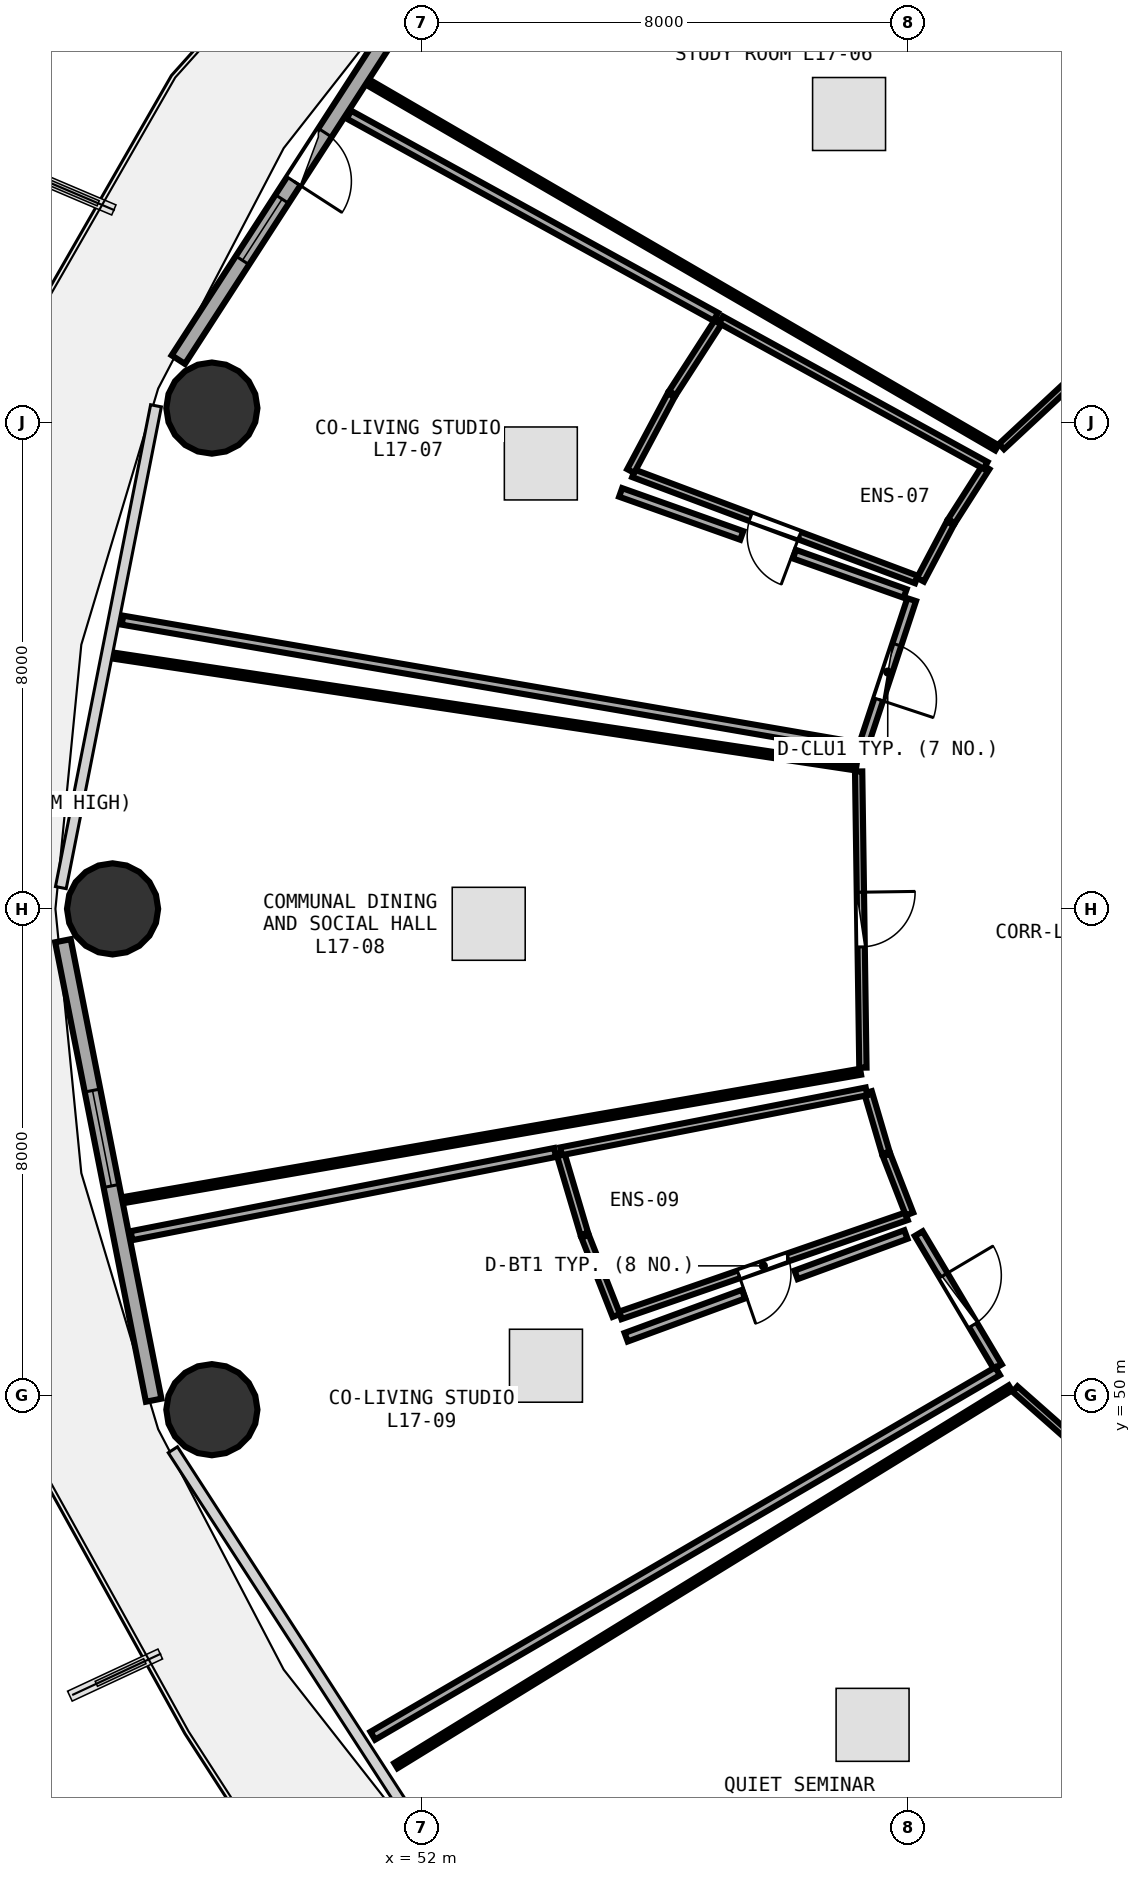
"""IFC4 building model, lengths in metres.
Left out: names, types, materials, properties, quantities, classifications, styles, units other than length and angle.
Written with IfcOpenShell. Run it as: python <this file> out.ifc"""

import sys

from ifc_helpers import new_model, si_unit, direction, frame, frame_2d, origin, origin_2d, place, context, subcontext, project, spatial, rectangle, circle, extrude, element, fill, save


model = new_model("IFC4")
c1 = context("Model", 3, precision=1e-05, world=origin(), true_north=direction((0.0, 1.0)))
c2 = subcontext(c1, "Body", "Model", "MODEL_VIEW")
j1 = project(units=[si_unit("LENGTHUNIT", "METRE"), si_unit("PLANEANGLEUNIT", "RADIAN")], contexts=[c1])
p1 = place(None, origin())
s1 = spatial("IfcSite", under=j1, at=p1, CompositionType="ELEMENT")
p2 = place(p1, origin())
s2 = spatial("IfcBuilding", under=s1, at=p2, CompositionType="ELEMENT")
p3 = place(p2, frame((0.0, 0.0, 67.5)))
s3 = spatial("IfcBuildingStorey", under=s2, at=p3, CompositionType="ELEMENT", Elevation=67.5)
for number, where, z_axis, x_axis in (
    (1, (48.553, 66.236, 0.0), (0.0, 0.0, 1.0), (1.0, 0.0, 0.0)),
    (2, (46.92, 58.0, 0.0), (0.0, 0.0, 1.0), (1.0, 0.0, 0.0)),
    (3, (48.553, 49.764, 0.0), (0.0, 0.0, 1.0), (1.0, 0.0, 0.0)),
):
    element("IfcColumn", number, at=place(p3, frame(where, z_axis=z_axis, x_axis=x_axis)), inside=s3, PredefinedType="COLUMN", context=c2, shape_type="SweptSolid", body=[
        extrude(circle(Radius=0.75, at=origin_2d()), origin(), (0.0, 0.0, 1.0), 4.76),
    ])
p4 = place(p3, frame((52.311, 73.698, 0.0), z_axis=(0.0, 0.0, 1.0), x_axis=(-0.543005114258, -0.839729388488, 0.0)))
e4 = element("IfcWall", 4, at=p4, inside=s3, PredefinedType="SOLIDWALL", context=c2, shape_type="SweptSolid", body=[
    extrude(rectangle(XDim=7.938, YDim=0.26, at=frame_2d((3.969, 0.0))), origin(), (0.0, 0.0, 1.0), 4.345),
])
p5 = place(p4, frame((3.494, 0.0, 0.0)))
e5 = element("IfcOpeningElement", 5, at=p5, cuts=e4, PredefinedType="OPENING", context=c2, shape_type="SweptSolid", body=[
    extrude(rectangle(XDim=0.95, YDim=2.1, at=frame_2d((0.475, 1.05))), frame((0.0, 0.14, 0.0), z_axis=(0.0, -1.0, 0.0), x_axis=(1.0, 0.0, 0.0)), (0.0, 0.0, 1.0), 0.28),
])
p6 = place(p4, frame((4.794, 0.0, 0.85)))
e6 = element("IfcOpeningElement", 6, at=p6, cuts=e4, PredefinedType="OPENING", context=c2, shape_type="SweptSolid", body=[
    extrude(rectangle(XDim=1.2, YDim=1.45, at=frame_2d((0.6, 0.725))), frame((0.0, 0.14, 0.0), z_axis=(0.0, -1.0, 0.0), x_axis=(1.0, 0.0, 0.0)), (0.0, 0.0, 1.0), 0.28),
])
p7 = place(p3, frame((46.104, 57.477, 0.0), z_axis=(0.0, 0.0, 1.0), x_axis=(0.193726159581, -0.98105564322, 0.0)))
e7 = element("IfcWall", 7, at=p7, inside=s3, PredefinedType="SOLIDWALL", context=c2, shape_type="SweptSolid", body=[
    extrude(rectangle(XDim=7.703, YDim=0.26, at=frame_2d((3.851, 0.0))), origin(), (0.0, 0.0, 1.0), 4.345),
])
p8 = place(p7, frame((2.511, 0.0, 0.85)))
e8 = element("IfcOpeningElement", 8, at=p8, cuts=e7, PredefinedType="OPENING", context=c2, shape_type="SweptSolid", body=[
    extrude(rectangle(XDim=1.6, YDim=1.45, at=frame_2d((0.8, 0.725))), frame((0.0, 0.14, 0.0), z_axis=(0.0, -1.0, 0.0), x_axis=(1.0, 0.0, 0.0)), (0.0, 0.0, 1.0), 0.28),
])
p9 = place(p3, frame((65.292, 69.097, 0.0), z_axis=(0.0, 0.0, 1.0), x_axis=(-0.731919362797, -0.681391257915, 0.0)))
e9 = element("IfcWall", 9, at=p9, inside=s3, PredefinedType="PARTITIONING", context=c2, shape_type="SweptSolid", body=[
    extrude(rectangle(XDim=5.126, YDim=0.12, at=frame_2d((2.563, 0.0))), origin(), (0.0, 0.0, 1.0), 2.345),
])
p10 = place(p9, frame((2.113, 0.0, 0.0)))
e10 = element("IfcOpeningElement", 10, at=p10, cuts=e9, PredefinedType="OPENING", context=c2, shape_type="SweptSolid", body=[
    extrude(rectangle(XDim=0.9, YDim=2.08, at=frame_2d((0.45, 1.04))), frame((0.0, 0.07, 0.0), z_axis=(0.0, -1.0, 0.0), x_axis=(1.0, 0.0, 0.0)), (0.0, 0.0, 1.0), 0.14),
])
p11 = place(p3, frame((60.141, 63.416, 0.0), z_axis=(0.0, 0.0, 1.0), x_axis=(-0.93625445313, 0.351322642301, 0.0)))
e11 = element("IfcWall", 11, at=p11, inside=s3, PredefinedType="PLUMBINGWALL", context=c2, shape_type="SweptSolid", body=[
    extrude(rectangle(XDim=4.969, YDim=0.13, at=frame_2d((2.485, 0.0))), origin(), (0.0, 0.0, 1.0), 2.345),
])
p12 = place(p11, frame((2.055, 0.0, 0.0)))
e12 = element("IfcOpeningElement", 12, at=p12, cuts=e11, PredefinedType="OPENING", context=c2, shape_type="SweptSolid", body=[
    extrude(rectangle(XDim=0.86, YDim=2.05, at=frame_2d((0.43, 1.025))), frame((0.0, 0.075, 0.0), z_axis=(0.0, -1.0, 0.0), x_axis=(1.0, 0.0, 0.0)), (0.0, 0.0, 1.0), 0.15),
])
p13 = place(p3, frame((60.062, 63.085, 0.0), z_axis=(0.0, 0.0, 1.0), x_axis=(-0.313977919329, -0.949430285052, 0.0)))
e13 = element("IfcWall", 13, at=p13, inside=s3, PredefinedType="PARTITIONING", context=c2, shape_type="SweptSolid", body=[
    extrude(rectangle(XDim=2.508, YDim=0.15, at=frame_2d((1.254, 0.0))), origin(), (0.0, 0.0, 1.0), 4.105),
])
p14 = place(p13, frame((0.779, 0.0, 0.0)))
e14 = element("IfcOpeningElement", 14, at=p14, cuts=e13, PredefinedType="OPENING", context=c2, shape_type="SweptSolid", body=[
    extrude(rectangle(XDim=0.95, YDim=2.08, at=frame_2d((0.475, 1.04))), frame((0.0, 0.085, 0.0), z_axis=(0.0, -1.0, 0.0), x_axis=(1.0, 0.0, 0.0)), (0.0, 0.0, 1.0), 0.17),
])
p15 = place(p3, frame((59.19, 60.26, 0.0), z_axis=(0.0, 0.0, 1.0), x_axis=(0.014383034903, -0.999896558803, 0.0)))
e15 = element("IfcWall", 15, at=p15, inside=s3, PredefinedType="PARTITIONING", context=c2, shape_type="SweptSolid", body=[
    extrude(rectangle(XDim=4.872, YDim=0.12, at=frame_2d((2.436, 0.0))), origin(), (0.0, 0.0, 1.0), 2.345),
])
p16 = place(p15, frame((1.986, 0.0, 0.0)))
e16 = element("IfcOpeningElement", 16, at=p16, cuts=e15, PredefinedType="OPENING", context=c2, shape_type="SweptSolid", body=[
    extrude(rectangle(XDim=0.9, YDim=2.08, at=frame_2d((0.45, 1.04))), frame((0.0, 0.07, 0.0), z_axis=(0.0, -1.0, 0.0), x_axis=(1.0, 0.0, 0.0)), (0.0, 0.0, 1.0), 0.14),
])
p17 = place(p3, frame((59.977, 52.944, 0.0), z_axis=(0.0, 0.0, 1.0), x_axis=(-0.945000053877, -0.327070173163, 0.0)))
e17 = element("IfcWall", 17, at=p17, inside=s3, PredefinedType="PLUMBINGWALL", context=c2, shape_type="SweptSolid", body=[
    extrude(rectangle(XDim=4.982, YDim=0.13, at=frame_2d((2.491, 0.0))), origin(), (0.0, 0.0, 1.0), 4.045),
])
p18 = place(p17, frame((2.061, 0.0, 0.0)))
e18 = element("IfcOpeningElement", 18, at=p18, cuts=e17, PredefinedType="OPENING", context=c2, shape_type="SweptSolid", body=[
    extrude(rectangle(XDim=0.86, YDim=2.05, at=frame_2d((0.43, 1.025))), frame((0.0, 0.075, 0.0), z_axis=(0.0, -1.0, 0.0), x_axis=(1.0, 0.0, 0.0)), (0.0, 0.0, 1.0), 0.15),
])
p19 = place(p3, frame((60.179, 52.659, 0.0), z_axis=(0.0, 0.0, 1.0), x_axis=(0.510684908265, -0.859767948036, 0.0)))
e19 = element("IfcWall", 19, at=p19, inside=s3, PredefinedType="PARTITIONING", context=c2, shape_type="SweptSolid", body=[
    extrude(rectangle(XDim=2.547, YDim=0.15, at=frame_2d((1.273, 0.0))), origin(), (0.0, 0.0, 1.0), 2.345),
])
p20 = place(p19, frame((0.799, 0.0, 0.0)))
e20 = element("IfcOpeningElement", 20, at=p20, cuts=e19, PredefinedType="OPENING", context=c2, shape_type="SweptSolid", body=[
    extrude(rectangle(XDim=0.95, YDim=2.08, at=frame_2d((0.475, 1.04))), frame((0.0, 0.085, 0.0), z_axis=(0.0, -1.0, 0.0), x_axis=(1.0, 0.0, 0.0)), (0.0, 0.0, 1.0), 0.17),
])
p21 = place(p3, frame((61.763, 50.103, 0.0), z_axis=(0.0, 0.0, 1.0), x_axis=(0.749467713759, -0.662040894532, 0.0)))
e21 = element("IfcWall", 21, at=p21, inside=s3, PredefinedType="PARTITIONING", context=c2, shape_type="SweptSolid", body=[
    extrude(rectangle(XDim=5.141, YDim=0.12, at=frame_2d((2.571, 0.0))), origin(), (0.0, 0.0, 1.0), 2.345),
])
p22 = place(p21, frame((2.121, 0.0, 0.0)))
e22 = element("IfcOpeningElement", 22, at=p22, cuts=e21, PredefinedType="OPENING", context=c2, shape_type="SweptSolid", body=[
    extrude(rectangle(XDim=0.9, YDim=2.08, at=frame_2d((0.45, 1.04))), frame((0.0, 0.07, 0.0), z_axis=(0.0, -1.0, 0.0), x_axis=(1.0, 0.0, 0.0)), (0.0, 0.0, 1.0), 0.14),
])
p23 = place(p3, frame((65.615, 69.358, 0.0), z_axis=(0.0, 0.0, 1.0), x_axis=(-0.6091849282, 0.793028198271, 0.0)))
e23 = element("IfcWall", 23, at=p23, inside=s3, PredefinedType="PARTITIONING", context=c2, shape_type="SweptSolid", body=[
    extrude(rectangle(XDim=11.289, YDim=0.1, at=frame_2d((5.645, 0.0))), origin(), (0.0, 0.0, 1.0), 2.345),
])
p24 = place(p3, frame((61.461, 65.583, 0.0), z_axis=(0.0, 0.0, 1.0), x_axis=(-0.864576212426, 0.502501714333, 0.0)))
e24 = element("IfcWall", 24, at=p24, inside=s3, PredefinedType="PARTITIONING", context=c2, shape_type="SweptSolid", body=[
    extrude(rectangle(XDim=11.9, YDim=0.1, at=frame_2d((5.95, 0.0))), origin(), (0.0, 0.0, 1.0), 2.345),
])
p25 = place(p3, frame((58.185, 77.973, 0.0), z_axis=(0.0, 0.0, 1.0), x_axis=(0.629127534858, -0.777302093708, 0.0)))
e25 = element("IfcWall", 25, at=p25, inside=s3, PredefinedType="PARTITIONING", context=c2, shape_type="SweptSolid", body=[
    extrude(rectangle(XDim=11.326, YDim=0.1, at=frame_2d((5.663, 0.0))), origin(), (0.0, 0.0, 1.0), 2.345),
])
p26 = place(p3, frame((61.285, 65.266, 0.0), z_axis=(0.0, 0.0, 1.0), x_axis=(-0.53816125517, -0.842841897057, 0.0)))
e26 = element("IfcWall", 26, at=p26, inside=s3, PredefinedType="PLUMBINGWALL", context=c2, shape_type="SweptSolid", body=[
    extrude(rectangle(XDim=1.056, YDim=0.13, at=frame_2d((0.528, 0.0))), origin(), (0.0, 0.0, 1.0), 2.345),
])
p27 = place(p3, frame((60.697, 64.341, 0.0), z_axis=(0.0, 0.0, 1.0), x_axis=(-0.467001016817, -0.884256778482, 0.0)))
e27 = element("IfcWall", 27, at=p27, inside=s3, PredefinedType="PLUMBINGWALL", context=c2, shape_type="SweptSolid", body=[
    extrude(rectangle(XDim=1.05, YDim=0.13, at=frame_2d((0.525, 0.0))), origin(), (0.0, 0.0, 1.0), 4.105),
])
p28 = place(p3, frame((55.441, 65.201, 0.0), z_axis=(0.0, 0.0, 1.0), x_axis=(0.470471737127, 0.882415063654, 0.0)))
e28 = element("IfcWall", 28, at=p28, inside=s3, PredefinedType="PLUMBINGWALL", context=c2, shape_type="SweptSolid", body=[
    extrude(rectangle(XDim=1.414, YDim=0.13, at=frame_2d((0.707, 0.0))), origin(), (0.0, 0.0, 1.0), 2.345),
])
p29 = place(p3, frame((56.127, 66.483, 0.0), z_axis=(0.0, 0.0, 1.0), x_axis=(0.542142481081, 0.840286576239, 0.0)))
e29 = element("IfcWall", 29, at=p29, inside=s3, PredefinedType="PLUMBINGWALL", context=c2, shape_type="SweptSolid", body=[
    extrude(rectangle(XDim=1.425, YDim=0.13, at=frame_2d((0.712, 0.0))), origin(), (0.0, 0.0, 1.0), 4.35),
])
p30 = place(p3, frame((56.927, 67.688, 0.0), z_axis=(0.0, 0.0, 1.0), x_axis=(0.87605188001, -0.48221686359, 0.0)))
e30 = element("IfcWall", 30, at=p30, inside=s3, PredefinedType="PLUMBINGWALL", context=c2, shape_type="SweptSolid", body=[
    extrude(rectangle(XDim=4.967, YDim=0.13, at=frame_2d((2.483, 0.0))), origin(), (0.0, 0.0, 1.0), 2.345),
])
p31 = place(p3, frame((59.217, 60.654, 0.0), z_axis=(0.0, 0.0, 1.0), x_axis=(-0.985427357527, 0.170096804898, 0.0)))
e31 = element("IfcWall", 31, at=p31, inside=s3, PredefinedType="PARTITIONING", context=c2, shape_type="SweptSolid", body=[
    extrude(rectangle(XDim=12.313, YDim=0.15, at=frame_2d((6.157, 0.0))), origin(), (0.0, 0.0, 1.0), 2.345),
])
p32 = place(p3, frame((50.807, 71.062, 0.0), z_axis=(0.0, 0.0, 1.0), x_axis=(0.875868518132, -0.482549830531, 0.0)))
e32 = element("IfcWall", 32, at=p32, inside=s3, PredefinedType="PARTITIONING", context=c2, shape_type="SweptSolid", body=[
    extrude(rectangle(XDim=6.889, YDim=0.15, at=frame_2d((3.445, 0.0))), origin(), (0.0, 0.0, 1.0), 2.345),
])
p33 = place(p3, frame((55.276, 64.849, 0.0), z_axis=(0.0, 0.0, 1.0), x_axis=(0.942346688621, -0.334638190357, 0.0)))
e33 = element("IfcWall", 33, at=p33, inside=s3, PredefinedType="PARTITIONING", context=c2, shape_type="SweptSolid", body=[
    extrude(rectangle(XDim=2.114, YDim=0.15, at=frame_2d((1.057, 0.0))), origin(), (0.0, 0.0, 1.0), 4.045),
])
p34 = place(p3, frame((58.135, 63.833, 0.0), z_axis=(0.0, 0.0, 1.0), x_axis=(0.942335197554, -0.334670547629, 0.0)))
e34 = element("IfcWall", 34, at=p34, inside=s3, PredefinedType="PARTITIONING", context=c2, shape_type="SweptSolid", body=[
    extrude(rectangle(XDim=1.932, YDim=0.15, at=frame_2d((0.966, 0.0))), origin(), (0.0, 0.0, 1.0), 4.105),
])
p35 = place(p3, frame((59.222, 55.322, 0.0), z_axis=(0.0, 0.0, 1.0), x_axis=(-0.985176076522, -0.171546198583, 0.0)))
e35 = element("IfcWall", 35, at=p35, inside=s3, PredefinedType="PARTITIONING", context=c2, shape_type="SweptSolid", body=[
    extrude(rectangle(XDim=12.312, YDim=0.1, at=frame_2d((6.156, 0.0))), origin(), (0.0, 0.0, 1.0), 2.345),
])
p36 = place(p3, frame((46.961, 62.161, 0.0), z_axis=(0.0, 0.0, 1.0), x_axis=(0.988857033015, -0.14886829164, 0.0)))
e36 = element("IfcWall", 36, at=p36, inside=s3, PredefinedType="PARTITIONING", context=c2, shape_type="SweptSolid", body=[
    extrude(rectangle(XDim=12.326, YDim=0.1, at=frame_2d((6.163, 0.0))), origin(), (0.0, 0.0, 1.0), 2.345),
])
p37 = place(p3, frame((59.344, 54.984, 0.0), z_axis=(0.0, 0.0, 1.0), x_axis=(0.282370492218, -0.959305428487, 0.0)))
e37 = element("IfcWall", 37, at=p37, inside=s3, PredefinedType="PLUMBINGWALL", context=c2, shape_type="SweptSolid", body=[
    extrude(rectangle(XDim=1.036, YDim=0.13, at=frame_2d((0.518, 0.0))), origin(), (0.0, 0.0, 1.0), 4.35),
])
p38 = place(p3, frame((59.649, 53.952, 0.0), z_axis=(0.0, 0.0, 1.0), x_axis=(0.362514197989, -0.931978248811, 0.0)))
e38 = element("IfcWall", 38, at=p38, inside=s3, PredefinedType="PLUMBINGWALL", context=c2, shape_type="SweptSolid", body=[
    extrude(rectangle(XDim=1.041, YDim=0.13, at=frame_2d((0.52, 0.0))), origin(), (0.0, 0.0, 1.0), 4.105),
])
p39 = place(p3, frame((55.205, 51.314, 0.0), z_axis=(0.0, 0.0, 1.0), x_axis=(-0.366277671592, 0.930505597669, 0.0)))
e39 = element("IfcWall", 39, at=p39, inside=s3, PredefinedType="PLUMBINGWALL", context=c2, shape_type="SweptSolid", body=[
    extrude(rectangle(XDim=1.401, YDim=0.13, at=frame_2d((0.701, 0.0))), origin(), (0.0, 0.0, 1.0), 4.35),
])
p40 = place(p3, frame((54.678, 52.655, 0.0), z_axis=(0.0, 0.0, 1.0), x_axis=(-0.284613387728, 0.958642383543, 0.0)))
e40 = element("IfcWall", 40, at=p40, inside=s3, PredefinedType="PLUMBINGWALL", context=c2, shape_type="SweptSolid", body=[
    extrude(rectangle(XDim=1.393, YDim=0.13, at=frame_2d((0.697, 0.0))), origin(), (0.0, 0.0, 1.0), 4.35),
])
p41 = place(p3, frame((54.296, 54.014, 0.0), z_axis=(0.0, 0.0, 1.0), x_axis=(0.981295026007, 0.192509926844, 0.0)))
e41 = element("IfcWall", 41, at=p41, inside=s3, PredefinedType="PLUMBINGWALL", context=c2, shape_type="SweptSolid", body=[
    extrude(rectangle(XDim=5.118, YDim=0.13, at=frame_2d((2.559, 0.0))), origin(), (0.0, 0.0, 1.0), 4.045),
])
p42 = place(p3, frame((61.476, 50.398, 0.0), z_axis=(0.0, 0.0, 1.0), x_axis=(-0.863734985538, -0.503946301462, 0.0)))
e42 = element("IfcWall", 42, at=p42, inside=s3, PredefinedType="PARTITIONING", context=c2, shape_type="SweptSolid", body=[
    extrude(rectangle(XDim=11.897, YDim=0.15, at=frame_2d((5.949, 0.0))), origin(), (0.0, 0.0, 1.0), 2.345),
])
p43 = place(p3, frame((47.231, 52.626, 0.0), z_axis=(0.0, 0.0, 1.0), x_axis=(0.98124289703, 0.192775457535, 0.0)))
e43 = element("IfcWall", 43, at=p43, inside=s3, PredefinedType="PARTITIONING", context=c2, shape_type="SweptSolid", body=[
    extrude(rectangle(XDim=7.1, YDim=0.15, at=frame_2d((3.55, 0.0))), origin(), (0.0, 0.0, 1.0), 2.345),
])
p44 = place(p3, frame((55.366, 50.956, 0.0), z_axis=(0.0, 0.0, 1.0), x_axis=(0.938773982481, 0.344533612028, 0.0)))
e44 = element("IfcWall", 44, at=p44, inside=s3, PredefinedType="PARTITIONING", context=c2, shape_type="SweptSolid", body=[
    extrude(rectangle(XDim=2.057, YDim=0.15, at=frame_2d((1.029, 0.0))), origin(), (0.0, 0.0, 1.0), 2.345),
])
p45 = place(p3, frame((58.161, 51.982, 0.0), z_axis=(0.0, 0.0, 1.0), x_axis=(0.938736795894, 0.344634919931, 0.0)))
e45 = element("IfcWall", 45, at=p45, inside=s3, PredefinedType="PARTITIONING", context=c2, shape_type="SweptSolid", body=[
    extrude(rectangle(XDim=1.924, YDim=0.15, at=frame_2d((0.962, 0.0))), origin(), (0.0, 0.0, 1.0), 4.105),
])
p46 = place(p3, frame((65.637, 46.628, 0.0), z_axis=(0.0, 0.0, 1.0), x_axis=(-0.607772837178, -0.79411093582, 0.0)))
e46 = element("IfcWall", 46, at=p46, inside=s3, PredefinedType="PARTITIONING", context=c2, shape_type="SweptSolid", body=[
    extrude(rectangle(XDim=11.286, YDim=0.1, at=frame_2d((5.643, 0.0))), origin(), (0.0, 0.0, 1.0), 2.345),
])
p47 = place(p3, frame((51.579, 43.91, 0.0), z_axis=(0.0, 0.0, 1.0), x_axis=(0.851889323335, 0.523721854412, 0.0)))
e47 = element("IfcWall", 47, at=p47, inside=s3, PredefinedType="PARTITIONING", context=c2, shape_type="SweptSolid", body=[
    extrude(rectangle(XDim=11.862, YDim=0.1, at=frame_2d((5.931, 0.0))), origin(), (0.0, 0.0, 1.0), 2.345),
])
p48 = place(p3, frame((59.34, 37.34, 0.0), z_axis=(0.0, 0.0, 1.0), x_axis=(0.587198342421, 0.809443084261, 0.0)))
e48 = element("IfcWall", 48, at=p48, inside=s3, PredefinedType="PARTITIONING", context=c2, shape_type="SweptSolid", body=[
    extrude(rectangle(XDim=11.25, YDim=0.1, at=frame_2d((5.625, 0.0))), origin(), (0.0, 0.0, 1.0), 2.345),
])
p49 = place(p5, frame((0.95, 0.0, 0.0), z_axis=(0.0, 0.0, 1.0), x_axis=(-1.0, 0.0, 0.0)))
e49 = element("IfcDoor", 49, at=p49, inside=s3, OperationType="SINGLE_SWING_LEFT", PredefinedType="DOOR", context=c2, shape_type="SweptSolid", body=[
    extrude(rectangle(XDim=0.95, YDim=2.1, at=frame_2d((0.475, 1.05))), frame((0.0, 0.025, 0.0), z_axis=(0.0, -1.0, 0.0), x_axis=(1.0, 0.0, 0.0)), (0.0, 0.0, 1.0), 0.05),
])
fill(e5, e49)
p50 = place(p6, origin())
e50 = element("IfcWindow", 50, at=p50, inside=s3, PartitioningType="SINGLE_PANEL", PredefinedType="WINDOW", context=c2, shape_type="SweptSolid", body=[
    extrude(rectangle(XDim=1.2, YDim=1.45, at=frame_2d((0.6, 0.725))), frame((0.0, 0.03, 0.0), z_axis=(0.0, -1.0, 0.0), x_axis=(1.0, 0.0, 0.0)), (0.0, 0.0, 1.0), 0.06),
])
fill(e6, e50)
p51 = place(p8, origin())
e51 = element("IfcWindow", 51, at=p51, inside=s3, PartitioningType="SINGLE_PANEL", PredefinedType="WINDOW", context=c2, shape_type="SweptSolid", body=[
    extrude(rectangle(XDim=1.6, YDim=1.45, at=frame_2d((0.8, 0.725))), frame((0.0, 0.03, 0.0), z_axis=(0.0, -1.0, 0.0), x_axis=(1.0, 0.0, 0.0)), (0.0, 0.0, 1.0), 0.06),
])
fill(e8, e51)
p52 = place(p12, origin())
e52 = element("IfcDoor", 52, at=p52, inside=s3, OperationType="SINGLE_SWING_LEFT", PredefinedType="DOOR", context=c2, shape_type="SweptSolid", body=[
    extrude(rectangle(XDim=0.86, YDim=2.05, at=frame_2d((0.43, 1.025))), frame((0.0, 0.025, 0.0), z_axis=(0.0, -1.0, 0.0), x_axis=(1.0, 0.0, 0.0)), (0.0, 0.0, 1.0), 0.05),
])
fill(e12, e52)
p53 = place(p14, origin())
e53 = element("IfcDoor", 53, at=p53, inside=s3, OperationType="SINGLE_SWING_RIGHT", PredefinedType="DOOR", context=c2, shape_type="SweptSolid", body=[
    extrude(rectangle(XDim=0.95, YDim=2.08, at=frame_2d((0.475, 1.04))), frame((0.0, 0.025, 0.0), z_axis=(0.0, -1.0, 0.0), x_axis=(1.0, 0.0, 0.0)), (0.0, 0.0, 1.0), 0.05),
])
fill(e14, e53)
p54 = place(p16, origin())
e54 = element("IfcDoor", 54, at=p54, inside=s3, OperationType="SINGLE_SWING_LEFT", PredefinedType="DOOR", context=c2, shape_type="SweptSolid", body=[
    extrude(rectangle(XDim=0.9, YDim=2.08, at=frame_2d((0.45, 1.04))), frame((0.0, 0.025, 0.0), z_axis=(0.0, -1.0, 0.0), x_axis=(1.0, 0.0, 0.0)), (0.0, 0.0, 1.0), 0.05),
])
fill(e16, e54)
p55 = place(p18, origin())
e55 = element("IfcDoor", 55, at=p55, inside=s3, OperationType="SINGLE_SWING_RIGHT", PredefinedType="DOOR", context=c2, shape_type="SweptSolid", body=[
    extrude(rectangle(XDim=0.86, YDim=2.05, at=frame_2d((0.43, 1.025))), frame((0.0, 0.025, 0.0), z_axis=(0.0, -1.0, 0.0), x_axis=(1.0, 0.0, 0.0)), (0.0, 0.0, 1.0), 0.05),
])
fill(e18, e55)
p56 = place(p20, origin())
e56 = element("IfcDoor", 56, at=p56, inside=s3, OperationType="SINGLE_SWING_LEFT", PredefinedType="DOOR", context=c2, shape_type="SweptSolid", body=[
    extrude(rectangle(XDim=0.95, YDim=2.08, at=frame_2d((0.475, 1.04))), frame((0.0, 0.025, 0.0), z_axis=(0.0, -1.0, 0.0), x_axis=(1.0, 0.0, 0.0)), (0.0, 0.0, 1.0), 0.05),
])
fill(e20, e56)
save(model, sys.argv[1])
